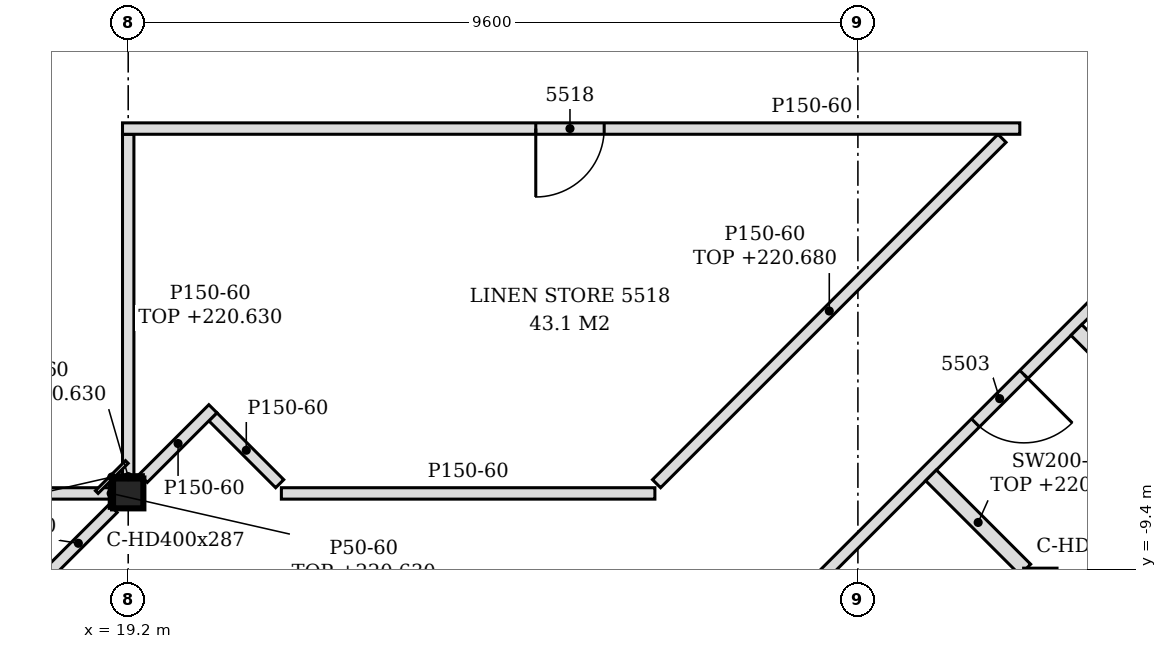
"""IFC4 building model, lengths in metres.
Left out: names, types, materials, properties, quantities, classifications, styles, units other than length and angle.
Written with IfcOpenShell. Run it as: python <this file> out.ifc"""

import sys

from ifc_helpers import new_model, si_unit, direction, frame, frame_2d, origin, origin_2d, place, context, subcontext, project, spatial, polyline, rectangle, i_section, outline, extrude, element, fill, save


model = new_model("IFC4")
c1 = context("Model", 3, precision=1e-05, world=origin(), true_north=direction((0.0, 1.0)))
c2 = subcontext(c1, "Body", "Model", "MODEL_VIEW")
j1 = project(units=[si_unit("LENGTHUNIT", "METRE"), si_unit("PLANEANGLEUNIT", "RADIAN")], contexts=[c1])
p1 = place(None, origin())
s1 = spatial("IfcSite", under=j1, at=p1, CompositionType="ELEMENT")
p2 = place(p1, origin())
s2 = spatial("IfcBuilding", under=s1, at=p2, CompositionType="ELEMENT")
p3 = place(p2, frame((0.0, 0.0, 217.8)))
s3 = spatial("IfcBuildingStorey", under=s2, at=p3, CompositionType="ELEMENT", Elevation=217.8)
p4 = place(p3, frame((19.2, -8.4, -0.15), z_axis=(0.0, 0.0, 1.0), x_axis=(1.0, 0.0, 0.0)))
e1 = element("IfcColumn", 1, at=p4, inside=s3, PredefinedType="COLUMN", context=c2, shape_type="SweptSolid", body=[
    extrude(i_section(OverallWidth=0.399, OverallDepth=0.393, WebThickness=0.023, FlangeThickness=0.037, FilletRadius=0.015, at=origin_2d()), origin(), (0.0, 0.0, 1.0), 3.6),
])
p5 = place(p3, frame((21.146, -16.672, 0.0), z_axis=(0.0, 0.0, 1.0), x_axis=(0.707100999376, 0.70711256295, 0.0)))
e2 = element("IfcWall", 2, at=p5, inside=s3, PredefinedType="PARTITIONING", context=c2, shape_type="SweptSolid", body=[
    extrude(rectangle(XDim=21.113, YDim=0.15, at=frame_2d((10.556, 0.0))), origin(), (0.0, 0.0, 1.0), 2.88),
])
p6 = place(p5, frame((2.466, 0.0, 0.0)))
e3 = element("IfcOpeningElement", 3, at=p6, cuts=e2, PredefinedType="OPENING", context=c2, shape_type="SweptSolid", body=[
    extrude(rectangle(XDim=0.9, YDim=2.1, at=frame_2d((0.45, 1.05))), frame((0.0, 0.085, 0.0), z_axis=(0.0, -1.0, 0.0), x_axis=(1.0, 0.0, 0.0)), (0.0, 0.0, 1.0), 0.17),
])
p7 = place(p5, frame((8.611, 0.0, 0.0)))
e4 = element("IfcOpeningElement", 4, at=p7, cuts=e2, PredefinedType="OPENING", context=c2, shape_type="SweptSolid", body=[
    extrude(rectangle(XDim=0.9, YDim=2.1, at=frame_2d((0.45, 1.05))), frame((0.0, 0.085, 0.0), z_axis=(0.0, -1.0, 0.0), x_axis=(1.0, 0.0, 0.0)), (0.0, 0.0, 1.0), 0.17),
])
p8 = place(p5, frame((13.012, 0.0, 0.0)))
e5 = element("IfcOpeningElement", 5, at=p8, cuts=e2, PredefinedType="OPENING", context=c2, shape_type="SweptSolid", body=[
    extrude(rectangle(XDim=0.9, YDim=2.1, at=frame_2d((0.45, 1.05))), frame((0.0, 0.085, 0.0), z_axis=(0.0, -1.0, 0.0), x_axis=(1.0, 0.0, 0.0)), (0.0, 0.0, 1.0), 0.17),
])
p9 = place(p5, frame((16.261, 0.0, 0.0)))
e6 = element("IfcOpeningElement", 6, at=p9, cuts=e2, PredefinedType="OPENING", context=c2, shape_type="SweptSolid", body=[
    extrude(rectangle(XDim=0.9, YDim=2.1, at=frame_2d((0.45, 1.05))), frame((0.0, 0.085, 0.0), z_axis=(0.0, -1.0, 0.0), x_axis=(1.0, 0.0, 0.0)), (0.0, 0.0, 1.0), 0.17),
])
p10 = place(p3, frame((35.86, -10.436, 0.0), z_axis=(0.0, 0.0, 1.0), x_axis=(-0.707106781187, 0.707106781187, 0.0)))
e7 = element("IfcWall", 7, at=p10, inside=s3, PredefinedType="PARTITIONING", context=c2, shape_type="SweptSolid", body=[
    extrude(rectangle(XDim=5.92, YDim=0.2, at=frame_2d((2.96, 0.0))), origin(), (0.0, 0.0, 1.0), 3.07),
])
p11 = place(p3, frame((18.086, -9.514, 0.0), z_axis=(0.0, 0.0, 1.0), x_axis=(0.707106781187, 0.707106781187, 0.0)))
e8 = element("IfcWall", 8, at=p11, inside=s3, PredefinedType="PARTITIONING", context=c2, shape_type="SweptSolid", body=[
    extrude(rectangle(XDim=1.295, YDim=0.15, at=frame_2d((0.648, 0.0))), origin(), (0.0, 0.0, 1.0), 3.45),
])
p12 = place(p3, frame((31.002, -9.402, 0.0), z_axis=(0.0, 0.0, 1.0), x_axis=(-0.707106781187, 0.707106781187, 0.0)))
e9 = element("IfcWall", 9, at=p12, inside=s3, PredefinedType="PARTITIONING", context=c2, shape_type="SweptSolid", body=[
    extrude(rectangle(XDim=1.754, YDim=0.2, at=frame_2d((0.877, 0.0))), origin(), (0.0, 0.0, 1.0), 2.93),
])
p13 = place(p3, frame((7.399, -8.4, 0.0), z_axis=(0.0, 0.0, 1.0), x_axis=(1.0, 0.0, 0.0)))
e10 = element("IfcWall", 10, at=p13, inside=s3, PredefinedType="PARTITIONING", context=c2, shape_type="SweptSolid", body=[
    extrude(rectangle(XDim=11.601, YDim=0.15, at=frame_2d((5.801, 0.0))), origin(), (0.0, 0.0, 1.0), 2.83),
])
p14 = place(p13, frame((4.601, 0.0, 0.0)))
e11 = element("IfcOpeningElement", 11, at=p14, cuts=e10, PredefinedType="OPENING", context=c2, shape_type="SweptSolid", body=[
    extrude(rectangle(XDim=0.9, YDim=2.1, at=frame_2d((0.45, 1.05))), frame((0.0, 0.085, 0.0), z_axis=(0.0, -1.0, 0.0), x_axis=(1.0, 0.0, 0.0)), (0.0, 0.0, 1.0), 0.17),
])
p15 = place(p3, frame((21.215, -8.4, 0.0), z_axis=(0.0, 0.0, 1.0), x_axis=(1.0, 0.0, 0.0)))
e12 = element("IfcWall", 12, at=p15, inside=s3, PredefinedType="PARTITIONING", context=c2, shape_type="SweptSolid", body=[
    extrude(rectangle(XDim=4.914, YDim=0.15, at=frame_2d((2.457, 0.0))), origin(), (0.0, 0.0, 1.0), 3.45),
])
p16 = place(p3, frame((21.193, -8.272, 0.0), z_axis=(0.0, 0.0, 1.0), x_axis=(-0.706812296552, 0.70740114323, 0.0)))
e13 = element("IfcWall", 13, at=p16, inside=s3, PredefinedType="PARTITIONING", context=c2, shape_type="SweptSolid", body=[
    extrude(rectangle(XDim=1.244, YDim=0.15, at=frame_2d((0.622, 0.0))), origin(), (0.0, 0.0, 1.0), 3.45),
])
p17 = place(p3, frame((26.151, -8.272, 0.0), z_axis=(0.0, 0.0, 1.0), x_axis=(0.707163762272, 0.707049795509, 0.0)))
e14 = element("IfcWall", 14, at=p17, inside=s3, PredefinedType="PARTITIONING", context=c2, shape_type="SweptSolid", body=[
    extrude(rectangle(XDim=6.427, YDim=0.15, at=frame_2d((3.213, 0.0))), origin(), (0.0, 0.0, 1.0), 2.88),
])
p18 = place(p3, frame((19.2, -8.204, 0.0), z_axis=(0.0, 0.0, 1.0), x_axis=(0.0, 1.0, 0.0)))
e15 = element("IfcWall", 15, at=p18, inside=s3, PredefinedType="PARTITIONING", context=c2, shape_type="SweptSolid", body=[
    extrude(rectangle(XDim=4.529, YDim=0.15, at=frame_2d((2.264, 0.0))), origin(), (0.0, 0.0, 1.0), 2.83),
])
p19 = place(p3, frame((19.398, -8.202, 0.0), z_axis=(0.0, 0.0, 1.0), x_axis=(0.707200993001, 0.707012556818, 0.0)))
e16 = element("IfcWall", 16, at=p19, inside=s3, PredefinedType="PARTITIONING", context=c2, shape_type="SweptSolid", body=[
    extrude(rectangle(XDim=1.296, YDim=0.15, at=frame_2d((0.648, 0.0))), origin(), (0.0, 0.0, 1.0), 3.45),
])
p20 = place(p3, frame((19.125, -3.6, 0.0), z_axis=(0.0, 0.0, 1.0), x_axis=(1.0, 0.0, 0.0)))
e17 = element("IfcWall", 17, at=p20, inside=s3, PredefinedType="PARTITIONING", context=c2, shape_type="SweptSolid", body=[
    extrude(outline(polyline([(0.0, 0.0), (11.805, 0.0), (11.805, 3.45), (0.225, 3.45), (0.223, 2.83), (0.0, 2.83), (0.0, 0.0)])), frame((0.0, 0.075, 0.0), z_axis=(0.0, -1.0, 0.0), x_axis=(1.0, 0.0, 0.0)), (0.0, 0.0, 1.0), 0.15),
])
p21 = place(p20, frame((5.437, 0.0, 0.0)))
e18 = element("IfcOpeningElement", 18, at=p21, cuts=e17, PredefinedType="OPENING", context=c2, shape_type="SweptSolid", body=[
    extrude(rectangle(XDim=0.9, YDim=2.1, at=frame_2d((0.45, 1.05))), frame((0.0, 0.085, 0.0), z_axis=(0.0, -1.0, 0.0), x_axis=(1.0, 0.0, 0.0)), (0.0, 0.0, 1.0), 0.17),
])
p22 = place(p3, frame((18.786, -8.382, 0.0), z_axis=(0.0, 0.0, 1.0), x_axis=(0.707106781187, 0.707106781187, 0.0)))
e19 = element("IfcWall", 19, at=p22, inside=s3, PredefinedType="PARTITIONING", context=c2, shape_type="SweptSolid", body=[
    extrude(rectangle(XDim=0.56, YDim=0.05, at=frame_2d((0.28, 0.0))), origin(), (0.0, 0.0, 1.0), 2.83),
])
p23 = place(p3, frame((19.0, -8.178, 0.0), z_axis=(0.0, 0.0, 1.0), x_axis=(1.0, 0.0, 0.0)))
e20 = element("IfcWall", 20, at=p23, inside=s3, PredefinedType="PARTITIONING", context=c2, shape_type="SweptSolid", body=[
    extrude(rectangle(XDim=0.399, YDim=0.05, at=frame_2d((0.199, 0.0))), origin(), (0.0, 0.0, 1.0), 2.83),
])
p24 = place(p3, frame((18.976, -8.596, 0.0), z_axis=(0.0, 0.0, 1.0), x_axis=(0.0, 1.0, 0.0)))
e21 = element("IfcWall", 21, at=p24, inside=s3, PredefinedType="PARTITIONING", context=c2, shape_type="SweptSolid", body=[
    extrude(rectangle(XDim=0.393, YDim=0.05, at=frame_2d((0.196, 0.0))), origin(), (0.0, 0.0, 1.0), 2.83),
])
p25 = place(p8, frame((0.9, 0.0, 0.0), z_axis=(0.0, 0.0, 1.0), x_axis=(-1.0, 0.0, 0.0)))
e22 = element("IfcDoor", 22, at=p25, inside=s3, OperationType="SINGLE_SWING_LEFT", PredefinedType="DOOR", context=c2, shape_type="SweptSolid", body=[
    extrude(rectangle(XDim=0.9, YDim=2.1, at=frame_2d((0.45, 1.05))), frame((0.0, 0.025, 0.0), z_axis=(0.0, -1.0, 0.0), x_axis=(1.0, 0.0, 0.0)), (0.0, 0.0, 1.0), 0.05),
])
fill(e5, e22)
p26 = place(p21, frame((0.9, 0.0, 0.0), z_axis=(0.0, 0.0, 1.0), x_axis=(-1.0, 0.0, 0.0)))
e23 = element("IfcDoor", 23, at=p26, inside=s3, OperationType="SINGLE_SWING_RIGHT", PredefinedType="DOOR", context=c2, shape_type="SweptSolid", body=[
    extrude(rectangle(XDim=0.9, YDim=2.1, at=frame_2d((0.45, 1.05))), frame((0.0, 0.025, 0.0), z_axis=(0.0, -1.0, 0.0), x_axis=(1.0, 0.0, 0.0)), (0.0, 0.0, 1.0), 0.05),
])
fill(e18, e23)
save(model, sys.argv[1])
